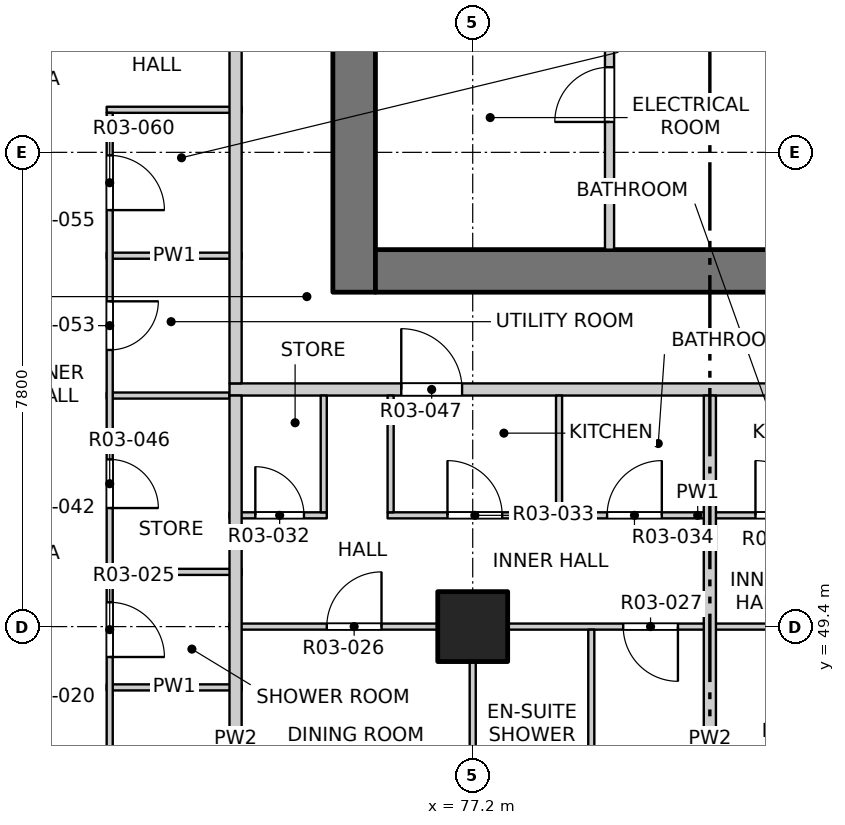
"""IFC4 building model, lengths in metres.
Left out: names, types, materials, properties, quantities, classifications, styles, units other than length and angle.
Written with IfcOpenShell. Run it as: python <this file> out.ifc"""

import sys

from ifc_helpers import new_model, si_unit, direction, frame, frame_2d, origin, origin_2d, place, context, subcontext, project, spatial, rectangle, extrude, element, fill, save


model = new_model("IFC4")
c1 = context("Model", 3, precision=1e-05, world=origin(), true_north=direction((0.0, 1.0)))
c2 = subcontext(c1, "Body", "Model", "MODEL_VIEW")
j1 = project(units=[si_unit("LENGTHUNIT", "METRE"), si_unit("PLANEANGLEUNIT", "RADIAN")], contexts=[c1])
p1 = place(None, origin())
s1 = spatial("IfcSite", under=j1, at=p1, CompositionType="ELEMENT")
p2 = place(p1, origin())
s2 = spatial("IfcBuilding", under=s1, at=p2, CompositionType="ELEMENT")
p3 = place(p2, frame((0.0, 0.0, 43.3)))
s3 = spatial("IfcBuildingStorey", under=s2, at=p3, CompositionType="ELEMENT", Elevation=43.3)
p4 = place(p3, frame((77.2, 49.4, -0.25), z_axis=(0.0, 0.0, 1.0), x_axis=(1.0, 0.0, 0.0)))
e1 = element("IfcColumn", 1, at=p4, inside=s3, PredefinedType="COLUMN", context=c2, shape_type="SweptSolid", body=[
    extrude(rectangle(XDim=1.15, YDim=1.15, at=origin_2d()), origin(), (0.0, 0.0, 1.0), 3.35),
])
p5 = place(p3, frame((75.25, 54.9, -0.25), z_axis=(0.0, 0.0, 1.0), x_axis=(0.0, 1.0, 0.0)))
e2 = element("IfcWall", 2, at=p5, inside=s3, PredefinedType="SOLIDWALL", context=c2, shape_type="SweptSolid", body=[
    extrude(rectangle(XDim=22.4, YDim=0.7, at=frame_2d((11.2, 0.0))), origin(), (0.0, 0.0, 1.0), 3.35),
])
p6 = place(p5, frame((7.55, 0.0, 0.25)))
e3 = element("IfcOpeningElement", 3, at=p6, cuts=e2, PredefinedType="OPENING", context=c2, shape_type="SweptSolid", body=[
    extrude(rectangle(XDim=0.9, YDim=2.1, at=frame_2d((0.45, 1.05))), frame((0.0, 0.36, 0.0), z_axis=(0.0, -1.0, 0.0), x_axis=(1.0, 0.0, 0.0)), (0.0, 0.0, 1.0), 0.72),
])
p7 = place(p5, frame((12.2, 0.0, 0.25)))
e4 = element("IfcOpeningElement", 4, at=p7, cuts=e2, PredefinedType="OPENING", context=c2, shape_type="SweptSolid", body=[
    extrude(rectangle(XDim=0.9, YDim=2.1, at=frame_2d((0.45, 1.05))), frame((0.0, 0.36, 0.0), z_axis=(0.0, -1.0, 0.0), x_axis=(1.0, 0.0, 0.0)), (0.0, 0.0, 1.0), 0.72),
])
p8 = place(p5, frame((16.7, 0.0, 0.25)))
e5 = element("IfcOpeningElement", 5, at=p8, cuts=e2, PredefinedType="OPENING", context=c2, shape_type="SweptSolid", body=[
    extrude(rectangle(XDim=0.9, YDim=2.1, at=frame_2d((0.45, 1.05))), frame((0.0, 0.36, 0.0), z_axis=(0.0, -1.0, 0.0), x_axis=(1.0, 0.0, 0.0)), (0.0, 0.0, 1.0), 0.72),
])
p9 = place(p5, frame((20.15, 0.0, 0.25)))
e6 = element("IfcOpeningElement", 6, at=p9, cuts=e2, PredefinedType="OPENING", context=c2, shape_type="SweptSolid", body=[
    extrude(rectangle(XDim=0.9, YDim=2.1, at=frame_2d((0.45, 1.05))), frame((0.0, 0.36, 0.0), z_axis=(0.0, -1.0, 0.0), x_axis=(1.0, 0.0, 0.0)), (0.0, 0.0, 1.0), 0.72),
])
p10 = place(p3, frame((75.6, 55.25, -0.25), z_axis=(0.0, 0.0, 1.0), x_axis=(1.0, 0.0, 0.0)))
e7 = element("IfcWall", 7, at=p10, inside=s3, PredefinedType="SOLIDWALL", context=c2, shape_type="SweptSolid", body=[
    extrude(rectangle(XDim=18.8, YDim=0.7, at=frame_2d((9.4, 0.0))), origin(), (0.0, 0.0, 1.0), 3.35),
])
p11 = place(p10, frame((8.65, 0.0, 0.25)))
e8 = element("IfcOpeningElement", 8, at=p11, cuts=e7, PredefinedType="OPENING", context=c2, shape_type="SweptSolid", body=[
    extrude(rectangle(XDim=1.5, YDim=2.1, at=frame_2d((0.75, 1.05))), frame((0.0, 0.36, 0.0), z_axis=(0.0, -1.0, 0.0), x_axis=(1.0, 0.0, 0.0)), (0.0, 0.0, 1.0), 0.72),
])
p12 = place(p3, frame((71.18, 48.4, 0.0), z_axis=(0.0, 0.0, 1.0), x_axis=(1.0, 0.0, 0.0)))
e9 = element("IfcWall", 9, at=p12, inside=s3, PredefinedType="PARTITIONING", context=c2, shape_type="SweptSolid", body=[
    extrude(rectangle(XDim=2.22, YDim=0.1, at=frame_2d((1.11, 0.0))), origin(), (0.0, 0.0, 1.0), 3.1),
])
p13 = place(p3, frame((73.2, 49.4, 0.0), z_axis=(0.0, 0.0, 1.0), x_axis=(1.0, 0.0, 0.0)))
e10 = element("IfcWall", 10, at=p13, inside=s3, PredefinedType="PARTITIONING", context=c2, shape_type="SweptSolid", body=[
    extrude(rectangle(XDim=23.6, YDim=0.1, at=frame_2d((11.8, 0.0))), origin(), (0.0, 0.0, 1.0), 3.1),
])
p14 = place(p13, frame((1.6, 0.0, 0.0)))
e11 = element("IfcOpeningElement", 11, at=p14, cuts=e10, PredefinedType="OPENING", context=c2, shape_type="SweptSolid", body=[
    extrude(rectangle(XDim=0.9, YDim=2.1, at=frame_2d((0.45, 1.05))), frame((0.0, 0.06, 0.0), z_axis=(0.0, -1.0, 0.0), x_axis=(1.0, 0.0, 0.0)), (0.0, 0.0, 1.0), 0.12),
])
p15 = place(p13, frame((6.475, 0.0, 0.0)))
e12 = element("IfcOpeningElement", 12, at=p15, cuts=e10, PredefinedType="OPENING", context=c2, shape_type="SweptSolid", body=[
    extrude(rectangle(XDim=0.9, YDim=2.1, at=frame_2d((0.45, 1.05))), frame((0.0, 0.06, 0.0), z_axis=(0.0, -1.0, 0.0), x_axis=(1.0, 0.0, 0.0)), (0.0, 0.0, 1.0), 0.12),
])
p16 = place(p13, frame((9.4, 0.0, 0.0)))
e13 = element("IfcOpeningElement", 13, at=p16, cuts=e10, PredefinedType="OPENING", context=c2, shape_type="SweptSolid", body=[
    extrude(rectangle(XDim=0.9, YDim=2.1, at=frame_2d((0.45, 1.05))), frame((0.0, 0.06, 0.0), z_axis=(0.0, -1.0, 0.0), x_axis=(1.0, 0.0, 0.0)), (0.0, 0.0, 1.0), 0.12),
])
p17 = place(p13, frame((14.275, 0.0, 0.0)))
e14 = element("IfcOpeningElement", 14, at=p17, cuts=e10, PredefinedType="OPENING", context=c2, shape_type="SweptSolid", body=[
    extrude(rectangle(XDim=0.9, YDim=2.1, at=frame_2d((0.45, 1.05))), frame((0.0, 0.06, 0.0), z_axis=(0.0, -1.0, 0.0), x_axis=(1.0, 0.0, 0.0)), (0.0, 0.0, 1.0), 0.12),
])
p18 = place(p13, frame((18.0, 0.0, 0.0)))
e15 = element("IfcOpeningElement", 15, at=p18, cuts=e10, PredefinedType="OPENING", context=c2, shape_type="SweptSolid", body=[
    extrude(rectangle(XDim=0.9, YDim=2.1, at=frame_2d((0.45, 1.05))), frame((0.0, 0.06, 0.0), z_axis=(0.0, -1.0, 0.0), x_axis=(1.0, 0.0, 0.0)), (0.0, 0.0, 1.0), 0.12),
])
p19 = place(p13, frame((21.1, 0.0, 0.0)))
e16 = element("IfcOpeningElement", 16, at=p19, cuts=e10, PredefinedType="OPENING", context=c2, shape_type="SweptSolid", body=[
    extrude(rectangle(XDim=0.9, YDim=2.1, at=frame_2d((0.45, 1.05))), frame((0.0, 0.06, 0.0), z_axis=(0.0, -1.0, 0.0), x_axis=(1.0, 0.0, 0.0)), (0.0, 0.0, 1.0), 0.12),
])
p20 = place(p3, frame((71.18, 50.3, 0.0), z_axis=(0.0, 0.0, 1.0), x_axis=(1.0, 0.0, 0.0)))
e17 = element("IfcWall", 17, at=p20, inside=s3, PredefinedType="PARTITIONING", context=c2, shape_type="SweptSolid", body=[
    extrude(rectangle(XDim=2.22, YDim=0.1, at=frame_2d((1.11, 0.0))), origin(), (0.0, 0.0, 1.0), 3.1),
])
p21 = place(p3, frame((73.2, 51.23, 0.0), z_axis=(0.0, 0.0, 1.0), x_axis=(1.0, 0.0, 0.0)))
e18 = element("IfcWall", 18, at=p21, inside=s3, PredefinedType="PARTITIONING", context=c2, shape_type="SweptSolid", body=[
    extrude(rectangle(XDim=1.6, YDim=0.1, at=frame_2d((0.8, 0.0))), origin(), (0.0, 0.0, 1.0), 3.1),
])
p22 = place(p21, frame((0.425, 0.0, 0.0)))
e19 = element("IfcOpeningElement", 19, at=p22, cuts=e18, PredefinedType="OPENING", context=c2, shape_type="SweptSolid", body=[
    extrude(rectangle(XDim=0.8, YDim=2.1, at=frame_2d((0.4, 1.05))), frame((0.0, 0.06, 0.0), z_axis=(0.0, -1.0, 0.0), x_axis=(1.0, 0.0, 0.0)), (0.0, 0.0, 1.0), 0.12),
])
p23 = place(p3, frame((75.8, 51.23, 0.0), z_axis=(0.0, 0.0, 1.0), x_axis=(1.0, 0.0, 0.0)))
e20 = element("IfcWall", 20, at=p23, inside=s3, PredefinedType="PARTITIONING", context=c2, shape_type="SweptSolid", body=[
    extrude(rectangle(XDim=10.2, YDim=0.1, at=frame_2d((5.1, 0.0))), origin(), (0.0, 0.0, 1.0), 3.1),
])
p24 = place(p23, frame((0.985, 0.0, 0.0)))
e21 = element("IfcOpeningElement", 21, at=p24, cuts=e20, PredefinedType="OPENING", context=c2, shape_type="SweptSolid", body=[
    extrude(rectangle(XDim=0.9, YDim=2.1, at=frame_2d((0.45, 1.05))), frame((0.0, 0.06, 0.0), z_axis=(0.0, -1.0, 0.0), x_axis=(1.0, 0.0, 0.0)), (0.0, 0.0, 1.0), 0.12),
])
p25 = place(p23, frame((3.61, 0.0, 0.0)))
e22 = element("IfcOpeningElement", 22, at=p25, cuts=e20, PredefinedType="OPENING", context=c2, shape_type="SweptSolid", body=[
    extrude(rectangle(XDim=0.9, YDim=2.1, at=frame_2d((0.45, 1.05))), frame((0.0, 0.06, 0.0), z_axis=(0.0, -1.0, 0.0), x_axis=(1.0, 0.0, 0.0)), (0.0, 0.0, 1.0), 0.12),
])
p26 = place(p23, frame((6.05, 0.0, 0.0)))
e23 = element("IfcOpeningElement", 23, at=p26, cuts=e20, PredefinedType="OPENING", context=c2, shape_type="SweptSolid", body=[
    extrude(rectangle(XDim=0.9, YDim=2.1, at=frame_2d((0.45, 1.05))), frame((0.0, 0.06, 0.0), z_axis=(0.0, -1.0, 0.0), x_axis=(1.0, 0.0, 0.0)), (0.0, 0.0, 1.0), 0.12),
])
p27 = place(p23, frame((8.525, 0.0, 0.0)))
e24 = element("IfcOpeningElement", 24, at=p27, cuts=e20, PredefinedType="OPENING", context=c2, shape_type="SweptSolid", body=[
    extrude(rectangle(XDim=0.8, YDim=2.1, at=frame_2d((0.4, 1.05))), frame((0.0, 0.06, 0.0), z_axis=(0.0, -1.0, 0.0), x_axis=(1.0, 0.0, 0.0)), (0.0, 0.0, 1.0), 0.12),
])
p28 = place(p3, frame((71.18, 53.2, 0.0), z_axis=(0.0, 0.0, 1.0), x_axis=(1.0, 0.0, 0.0)))
e25 = element("IfcWall", 25, at=p28, inside=s3, PredefinedType="PARTITIONING", context=c2, shape_type="SweptSolid", body=[
    extrude(rectangle(XDim=2.02, YDim=0.1, at=frame_2d((1.01, 0.0))), origin(), (0.0, 0.0, 1.0), 3.1),
])
p29 = place(p3, frame((73.2, 53.3, 0.0), z_axis=(0.0, 0.0, 1.0), x_axis=(1.0, 0.0, 0.0)))
e26 = element("IfcWall", 26, at=p29, inside=s3, PredefinedType="PARTITIONING", context=c2, shape_type="SweptSolid", body=[
    extrude(rectangle(XDim=23.6, YDim=0.2, at=frame_2d((11.8, 0.0))), origin(), (0.0, 0.0, 1.0), 3.1),
])
p30 = place(p29, frame((2.825, 0.0, 0.0)))
e27 = element("IfcOpeningElement", 27, at=p30, cuts=e26, PredefinedType="OPENING", context=c2, shape_type="SweptSolid", body=[
    extrude(rectangle(XDim=1.0, YDim=2.1, at=frame_2d((0.5, 1.05))), frame((0.0, 0.11, 0.0), z_axis=(0.0, -1.0, 0.0), x_axis=(1.0, 0.0, 0.0)), (0.0, 0.0, 1.0), 0.22),
])
p31 = place(p29, frame((14.025, 0.0, 0.0)))
e28 = element("IfcOpeningElement", 28, at=p31, cuts=e26, PredefinedType="OPENING", context=c2, shape_type="SweptSolid", body=[
    extrude(rectangle(XDim=1.0, YDim=2.1, at=frame_2d((0.5, 1.05))), frame((0.0, 0.11, 0.0), z_axis=(0.0, -1.0, 0.0), x_axis=(1.0, 0.0, 0.0)), (0.0, 0.0, 1.0), 0.22),
])
p32 = place(p29, frame((21.975, 0.0, 0.0)))
e29 = element("IfcOpeningElement", 29, at=p32, cuts=e26, PredefinedType="OPENING", context=c2, shape_type="SweptSolid", body=[
    extrude(rectangle(XDim=1.0, YDim=2.1, at=frame_2d((0.5, 1.05))), frame((0.0, 0.11, 0.0), z_axis=(0.0, -1.0, 0.0), x_axis=(1.0, 0.0, 0.0)), (0.0, 0.0, 1.0), 0.22),
])
for number, where, z_axis, x_axis in (
    (30, (71.18, 55.5, 0.0), (0.0, 0.0, 1.0), (1.0, 0.0, 0.0)),
    (31, (71.18, 57.9, 0.0), (0.0, 0.0, 1.0), (1.0, 0.0, 0.0)),
):
    element("IfcWall", number, at=place(p3, frame(where, z_axis=z_axis, x_axis=x_axis)), inside=s3, PredefinedType="PARTITIONING", context=c2, shape_type="SweptSolid", body=[
        extrude(rectangle(XDim=2.22, YDim=0.1, at=frame_2d((1.11, 0.0))), origin(), (0.0, 0.0, 1.0), 3.1),
    ])
p33 = place(p3, frame((71.23, 45.55, 0.0), z_axis=(0.0, 0.0, 1.0), x_axis=(0.0, 1.0, 0.0)))
e32 = element("IfcWall", 32, at=p33, inside=s3, PredefinedType="PARTITIONING", context=c2, shape_type="SweptSolid", body=[
    extrude(rectangle(XDim=12.3, YDim=0.1, at=frame_2d((6.15, 0.0))), origin(), (0.0, 0.0, 1.0), 3.1),
])
p34 = place(p33, frame((1.0, 0.0, 0.0)))
e33 = element("IfcOpeningElement", 33, at=p34, cuts=e32, PredefinedType="OPENING", context=c2, shape_type="SweptSolid", body=[
    extrude(rectangle(XDim=0.8, YDim=2.1, at=frame_2d((0.4, 1.05))), frame((0.0, 0.06, 0.0), z_axis=(0.0, -1.0, 0.0), x_axis=(1.0, 0.0, 0.0)), (0.0, 0.0, 1.0), 0.12),
])
p35 = place(p33, frame((3.35, 0.0, 0.0)))
e34 = element("IfcOpeningElement", 34, at=p35, cuts=e32, PredefinedType="OPENING", context=c2, shape_type="SweptSolid", body=[
    extrude(rectangle(XDim=0.9, YDim=2.1, at=frame_2d((0.45, 1.05))), frame((0.0, 0.06, 0.0), z_axis=(0.0, -1.0, 0.0), x_axis=(1.0, 0.0, 0.0)), (0.0, 0.0, 1.0), 0.12),
])
p36 = place(p33, frame((5.8, 0.0, 0.0)))
e35 = element("IfcOpeningElement", 35, at=p36, cuts=e32, PredefinedType="OPENING", context=c2, shape_type="SweptSolid", body=[
    extrude(rectangle(XDim=0.8, YDim=2.1, at=frame_2d((0.4, 1.05))), frame((0.0, 0.06, 0.0), z_axis=(0.0, -1.0, 0.0), x_axis=(1.0, 0.0, 0.0)), (0.0, 0.0, 1.0), 0.12),
])
p37 = place(p33, frame((8.4, 0.0, 0.0)))
e36 = element("IfcOpeningElement", 36, at=p37, cuts=e32, PredefinedType="OPENING", context=c2, shape_type="SweptSolid", body=[
    extrude(rectangle(XDim=0.8, YDim=2.1, at=frame_2d((0.4, 1.05))), frame((0.0, 0.06, 0.0), z_axis=(0.0, -1.0, 0.0), x_axis=(1.0, 0.0, 0.0)), (0.0, 0.0, 1.0), 0.12),
])
p38 = place(p33, frame((10.7, 0.0, 0.0)))
e37 = element("IfcOpeningElement", 37, at=p38, cuts=e32, PredefinedType="OPENING", context=c2, shape_type="SweptSolid", body=[
    extrude(rectangle(XDim=0.9, YDim=2.1, at=frame_2d((0.45, 1.05))), frame((0.0, 0.06, 0.0), z_axis=(0.0, -1.0, 0.0), x_axis=(1.0, 0.0, 0.0)), (0.0, 0.0, 1.0), 0.12),
])
p39 = place(p3, frame((73.3, 41.9, 0.0), z_axis=(0.0, 0.0, 1.0), x_axis=(0.0, 1.0, 0.0)))
e38 = element("IfcWall", 38, at=p39, inside=s3, PredefinedType="PARTITIONING", context=c2, shape_type="SweptSolid", body=[
    extrude(rectangle(XDim=11.3, YDim=0.2, at=frame_2d((5.65, 0.0))), origin(), (0.0, 0.0, 1.0), 3.1),
])
p40 = place(p3, frame((73.3, 53.4, 0.0), z_axis=(0.0, 0.0, 1.0), x_axis=(0.0, 1.0, 0.0)))
e39 = element("IfcWall", 39, at=p40, inside=s3, PredefinedType="PARTITIONING", context=c2, shape_type="SweptSolid", body=[
    extrude(rectangle(XDim=31.0, YDim=0.2, at=frame_2d((15.5, 0.0))), origin(), (0.0, 0.0, 1.0), 3.1),
])
p41 = place(p40, frame((5.775, 0.0, 0.0)))
e40 = element("IfcOpeningElement", 40, at=p41, cuts=e39, PredefinedType="OPENING", context=c2, shape_type="SweptSolid", body=[
    extrude(rectangle(XDim=1.0, YDim=2.1, at=frame_2d((0.5, 1.05))), frame((0.0, 0.11, 0.0), z_axis=(0.0, -1.0, 0.0), x_axis=(1.0, 0.0, 0.0)), (0.0, 0.0, 1.0), 0.22),
])
p42 = place(p40, frame((10.875, 0.0, 0.0)))
e41 = element("IfcOpeningElement", 41, at=p42, cuts=e39, PredefinedType="OPENING", context=c2, shape_type="SweptSolid", body=[
    extrude(rectangle(XDim=1.0, YDim=2.1, at=frame_2d((0.5, 1.05))), frame((0.0, 0.11, 0.0), z_axis=(0.0, -1.0, 0.0), x_axis=(1.0, 0.0, 0.0)), (0.0, 0.0, 1.0), 0.22),
])
p43 = place(p40, frame((18.025, 0.0, 0.0)))
e42 = element("IfcOpeningElement", 42, at=p43, cuts=e39, PredefinedType="OPENING", context=c2, shape_type="SweptSolid", body=[
    extrude(rectangle(XDim=1.0, YDim=2.1, at=frame_2d((0.5, 1.05))), frame((0.0, 0.11, 0.0), z_axis=(0.0, -1.0, 0.0), x_axis=(1.0, 0.0, 0.0)), (0.0, 0.0, 1.0), 0.22),
])
p44 = place(p40, frame((27.725, 0.0, 0.0)))
e43 = element("IfcOpeningElement", 43, at=p44, cuts=e39, PredefinedType="OPENING", context=c2, shape_type="SweptSolid", body=[
    extrude(rectangle(XDim=1.0, YDim=2.1, at=frame_2d((0.5, 1.05))), frame((0.0, 0.11, 0.0), z_axis=(0.0, -1.0, 0.0), x_axis=(1.0, 0.0, 0.0)), (0.0, 0.0, 1.0), 0.22),
])
for number, where, z_axis, x_axis in (
    (44, (74.75, 51.28, 0.0), (0.0, 0.0, 1.0), (0.0, 1.0, 0.0)),
    (45, (75.85, 51.28, 0.0), (0.0, 0.0, 1.0), (0.0, 1.0, 0.0)),
):
    element("IfcWall", number, at=place(p3, frame(where, z_axis=z_axis, x_axis=x_axis)), inside=s3, PredefinedType="PARTITIONING", context=c2, shape_type="SweptSolid", body=[
        extrude(rectangle(XDim=1.92, YDim=0.1, at=frame_2d((0.96, 0.0))), origin(), (0.0, 0.0, 1.0), 3.1),
    ])
p45 = place(p3, frame((77.2, 41.9, 0.0), z_axis=(0.0, 0.0, 1.0), x_axis=(0.0, 1.0, 0.0)))
e46 = element("IfcWall", 46, at=p45, inside=s3, PredefinedType="PARTITIONING", context=c2, shape_type="SweptSolid", body=[
    extrude(rectangle(XDim=7.45, YDim=0.1, at=frame_2d((3.725, 0.0))), origin(), (0.0, 0.0, 1.0), 3.1),
])
p46 = place(p3, frame((78.62, 51.28, 0.0), z_axis=(0.0, 0.0, 1.0), x_axis=(0.0, 1.0, 0.0)))
e47 = element("IfcWall", 47, at=p46, inside=s3, PredefinedType="PARTITIONING", context=c2, shape_type="SweptSolid", body=[
    extrude(rectangle(XDim=1.92, YDim=0.1, at=frame_2d((0.96, 0.0))), origin(), (0.0, 0.0, 1.0), 3.1),
])
p47 = place(p3, frame((79.15, 45.85, 0.0), z_axis=(0.0, 0.0, 1.0), x_axis=(0.0, 1.0, 0.0)))
e48 = element("IfcWall", 48, at=p47, inside=s3, PredefinedType="PARTITIONING", context=c2, shape_type="SweptSolid", body=[
    extrude(rectangle(XDim=3.5, YDim=0.1, at=frame_2d((1.75, 0.0))), origin(), (0.0, 0.0, 1.0), 3.1),
])
p48 = place(p3, frame((79.45, 55.6, 0.0), z_axis=(0.0, 0.0, 1.0), x_axis=(0.0, 1.0, 0.0)))
e49 = element("IfcWall", 49, at=p48, inside=s3, PredefinedType="PARTITIONING", context=c2, shape_type="SweptSolid", body=[
    extrude(rectangle(XDim=5.3, YDim=0.15, at=frame_2d((2.65, 0.0))), origin(), (0.0, 0.0, 1.0), 3.1),
])
p49 = place(p48, frame((2.1, 0.0, 0.0)))
e50 = element("IfcOpeningElement", 50, at=p49, cuts=e49, PredefinedType="OPENING", context=c2, shape_type="SweptSolid", body=[
    extrude(rectangle(XDim=0.9, YDim=2.1, at=frame_2d((0.45, 1.05))), frame((0.0, 0.085, 0.0), z_axis=(0.0, -1.0, 0.0), x_axis=(1.0, 0.0, 0.0)), (0.0, 0.0, 1.0), 0.17),
])
p50 = place(p3, frame((81.1, 41.9, 0.0), z_axis=(0.0, 0.0, 1.0), x_axis=(0.0, 1.0, 0.0)))
e51 = element("IfcWall", 51, at=p50, inside=s3, PredefinedType="PARTITIONING", context=c2, shape_type="SweptSolid", body=[
    extrude(rectangle(XDim=11.3, YDim=0.2, at=frame_2d((5.65, 0.0))), origin(), (0.0, 0.0, 1.0), 3.1),
])
p51 = place(p35, origin())
e52 = element("IfcDoor", 52, at=p51, inside=s3, OperationType="SINGLE_SWING_RIGHT", PredefinedType="DOOR", context=c2, shape_type="SweptSolid", body=[
    extrude(rectangle(XDim=0.9, YDim=2.1, at=frame_2d((0.45, 1.05))), frame((0.0, 0.025, 0.0), z_axis=(0.0, -1.0, 0.0), x_axis=(1.0, 0.0, 0.0)), (0.0, 0.0, 1.0), 0.05),
])
fill(e34, e52)
p52 = place(p14, origin())
e53 = element("IfcDoor", 53, at=p52, inside=s3, OperationType="SINGLE_SWING_RIGHT", PredefinedType="DOOR", context=c2, shape_type="SweptSolid", body=[
    extrude(rectangle(XDim=0.9, YDim=2.1, at=frame_2d((0.45, 1.05))), frame((0.0, 0.025, 0.0), z_axis=(0.0, -1.0, 0.0), x_axis=(1.0, 0.0, 0.0)), (0.0, 0.0, 1.0), 0.05),
])
fill(e11, e53)
p53 = place(p15, origin())
e54 = element("IfcDoor", 54, at=p53, inside=s3, OperationType="SINGLE_SWING_LEFT", PredefinedType="DOOR", context=c2, shape_type="SweptSolid", body=[
    extrude(rectangle(XDim=0.9, YDim=2.1, at=frame_2d((0.45, 1.05))), frame((0.0, 0.025, 0.0), z_axis=(0.0, -1.0, 0.0), x_axis=(1.0, 0.0, 0.0)), (0.0, 0.0, 1.0), 0.05),
])
fill(e12, e54)
p54 = place(p22, origin())
e55 = element("IfcDoor", 55, at=p54, inside=s3, OperationType="SINGLE_SWING_LEFT", PredefinedType="DOOR", context=c2, shape_type="SweptSolid", body=[
    extrude(rectangle(XDim=0.8, YDim=2.1, at=frame_2d((0.4, 1.05))), frame((0.0, 0.025, 0.0), z_axis=(0.0, -1.0, 0.0), x_axis=(1.0, 0.0, 0.0)), (0.0, 0.0, 1.0), 0.05),
])
fill(e19, e55)
p55 = place(p24, origin())
e56 = element("IfcDoor", 56, at=p55, inside=s3, OperationType="SINGLE_SWING_LEFT", PredefinedType="DOOR", context=c2, shape_type="SweptSolid", body=[
    extrude(rectangle(XDim=0.9, YDim=2.1, at=frame_2d((0.45, 1.05))), frame((0.0, 0.025, 0.0), z_axis=(0.0, -1.0, 0.0), x_axis=(1.0, 0.0, 0.0)), (0.0, 0.0, 1.0), 0.05),
])
fill(e21, e56)
p56 = place(p25, origin())
e57 = element("IfcDoor", 57, at=p56, inside=s3, OperationType="SINGLE_SWING_RIGHT", PredefinedType="DOOR", context=c2, shape_type="SweptSolid", body=[
    extrude(rectangle(XDim=0.9, YDim=2.1, at=frame_2d((0.45, 1.05))), frame((0.0, 0.025, 0.0), z_axis=(0.0, -1.0, 0.0), x_axis=(1.0, 0.0, 0.0)), (0.0, 0.0, 1.0), 0.05),
])
fill(e22, e57)
p57 = place(p26, origin())
e58 = element("IfcDoor", 58, at=p57, inside=s3, OperationType="SINGLE_SWING_LEFT", PredefinedType="DOOR", context=c2, shape_type="SweptSolid", body=[
    extrude(rectangle(XDim=0.9, YDim=2.1, at=frame_2d((0.45, 1.05))), frame((0.0, 0.025, 0.0), z_axis=(0.0, -1.0, 0.0), x_axis=(1.0, 0.0, 0.0)), (0.0, 0.0, 1.0), 0.05),
])
fill(e23, e58)
p58 = place(p36, origin())
e59 = element("IfcDoor", 59, at=p58, inside=s3, OperationType="SINGLE_SWING_RIGHT", PredefinedType="DOOR", context=c2, shape_type="SweptSolid", body=[
    extrude(rectangle(XDim=0.8, YDim=2.1, at=frame_2d((0.4, 1.05))), frame((0.0, 0.025, 0.0), z_axis=(0.0, -1.0, 0.0), x_axis=(1.0, 0.0, 0.0)), (0.0, 0.0, 1.0), 0.05),
])
fill(e35, e59)
p59 = place(p30, origin())
e60 = element("IfcDoor", 60, at=p59, inside=s3, OperationType="SINGLE_SWING_LEFT", PredefinedType="DOOR", context=c2, shape_type="SweptSolid", body=[
    extrude(rectangle(XDim=1.0, YDim=2.1, at=frame_2d((0.5, 1.05))), frame((0.0, 0.025, 0.0), z_axis=(0.0, -1.0, 0.0), x_axis=(1.0, 0.0, 0.0)), (0.0, 0.0, 1.0), 0.05),
])
fill(e27, e60)
p60 = place(p37, origin())
e61 = element("IfcDoor", 61, at=p60, inside=s3, OperationType="SINGLE_SWING_LEFT", PredefinedType="DOOR", context=c2, shape_type="SweptSolid", body=[
    extrude(rectangle(XDim=0.8, YDim=2.1, at=frame_2d((0.4, 1.05))), frame((0.0, 0.025, 0.0), z_axis=(0.0, -1.0, 0.0), x_axis=(1.0, 0.0, 0.0)), (0.0, 0.0, 1.0), 0.05),
])
fill(e36, e61)
p61 = place(p38, origin())
e62 = element("IfcDoor", 62, at=p61, inside=s3, OperationType="SINGLE_SWING_RIGHT", PredefinedType="DOOR", context=c2, shape_type="SweptSolid", body=[
    extrude(rectangle(XDim=0.9, YDim=2.1, at=frame_2d((0.45, 1.05))), frame((0.0, 0.025, 0.0), z_axis=(0.0, -1.0, 0.0), x_axis=(1.0, 0.0, 0.0)), (0.0, 0.0, 1.0), 0.05),
])
fill(e37, e62)
p62 = place(p49, origin())
e63 = element("IfcDoor", 63, at=p62, inside=s3, OperationType="SINGLE_SWING_LEFT", PredefinedType="DOOR", context=c2, shape_type="SweptSolid", body=[
    extrude(rectangle(XDim=0.9, YDim=2.1, at=frame_2d((0.45, 1.05))), frame((0.0, 0.025, 0.0), z_axis=(0.0, -1.0, 0.0), x_axis=(1.0, 0.0, 0.0)), (0.0, 0.0, 1.0), 0.05),
])
fill(e50, e63)
save(model, sys.argv[1])
